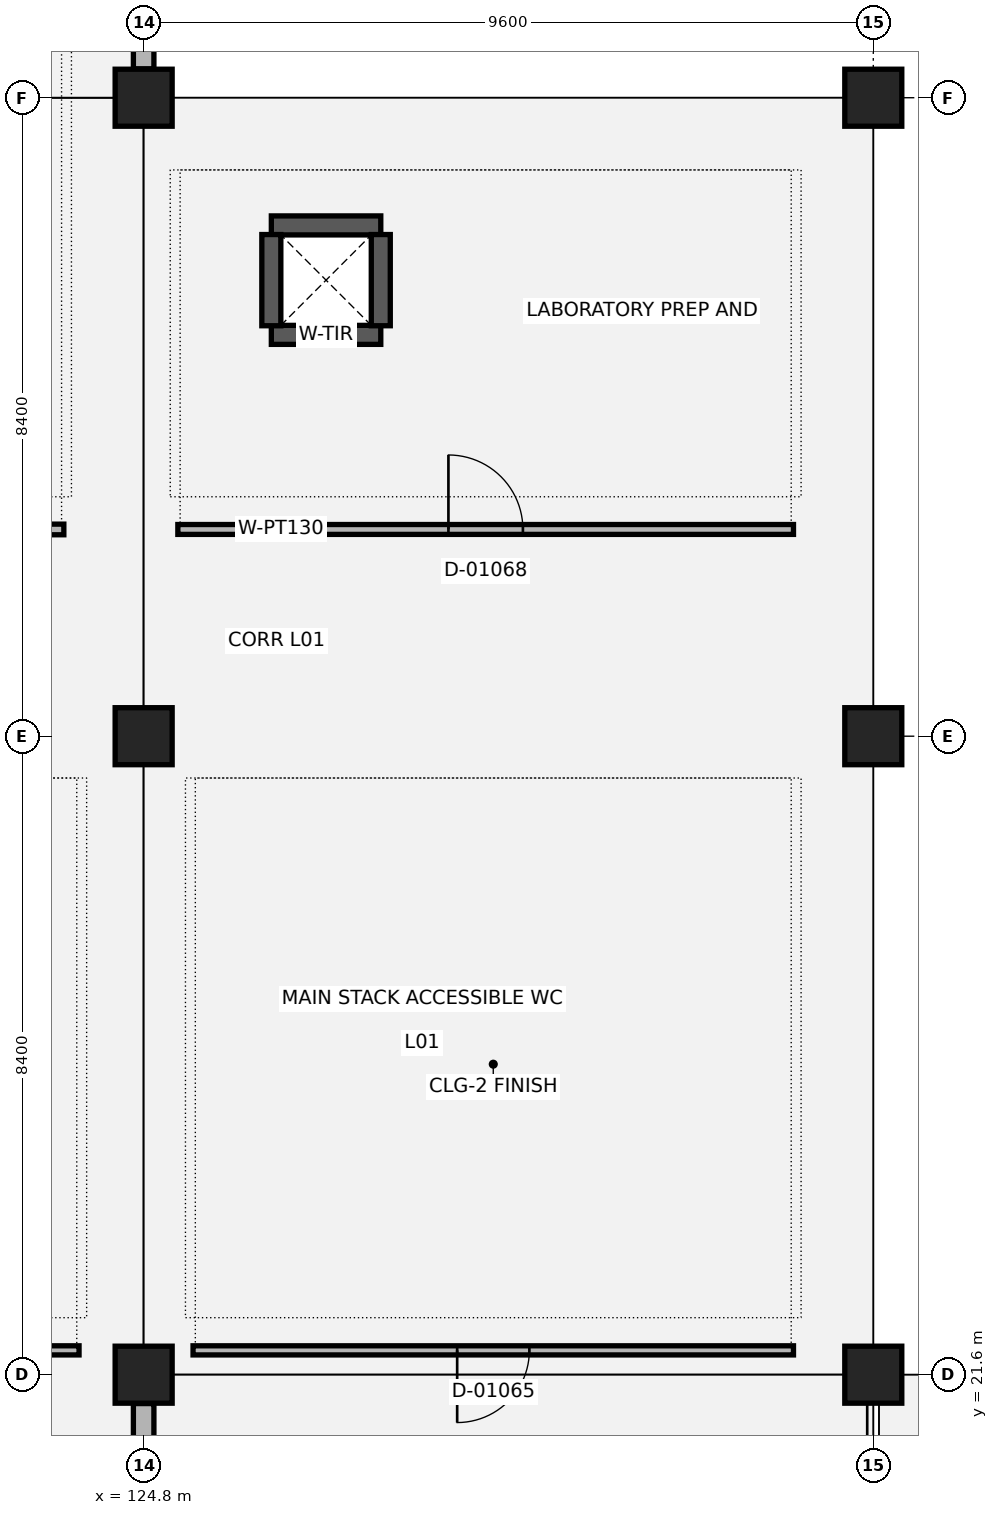
"""IFC4 building model, lengths in metres.
Left out: names, types, materials, properties, quantities, classifications, styles, units other than length and angle.
Written with IfcOpenShell. Run it as: python <this file> out.ifc"""

import sys

from ifc_helpers import new_model, si_unit, direction, frame, frame_2d, origin, origin_2d, place, context, subcontext, project, spatial, rectangle, extrude, element, fill, save


model = new_model("IFC4")
c1 = context("Model", 3, precision=1e-05, world=origin(), true_north=direction((0.0, 1.0)))
c2 = subcontext(c1, "Body", "Model", "MODEL_VIEW")
j1 = project(units=[si_unit("LENGTHUNIT", "METRE"), si_unit("PLANEANGLEUNIT", "RADIAN")], contexts=[c1])
p1 = place(None, origin())
s1 = spatial("IfcSite", under=j1, at=p1, CompositionType="ELEMENT")
p2 = place(p1, origin())
s2 = spatial("IfcBuilding", under=s1, at=p2, CompositionType="ELEMENT")
p3 = place(p2, frame((0.0, 0.0, 5.4)))
s3 = spatial("IfcBuildingStorey", under=s2, at=p3, CompositionType="ELEMENT", Elevation=5.4)
for number, where, z_axis, x_axis in (
    (1, (124.8, 21.6, 0.0), (0.0, 0.0, 1.0), (1.0, 0.0, 0.0)),
    (2, (124.8, 30.0, 0.0), (0.0, 0.0, 1.0), (1.0, 0.0, 0.0)),
    (3, (124.8, 38.4, 0.0), (0.0, 0.0, 1.0), (1.0, 0.0, 0.0)),
    (4, (134.4, 21.6, 0.0), (0.0, 0.0, 1.0), (1.0, 0.0, 0.0)),
    (5, (134.4, 30.0, 0.0), (0.0, 0.0, 1.0), (1.0, 0.0, 0.0)),
    (6, (134.4, 38.4, 0.0), (0.0, 0.0, 1.0), (1.0, 0.0, 0.0)),
):
    element("IfcColumn", number, at=place(p3, frame(where, z_axis=z_axis, x_axis=x_axis)), inside=s3, PredefinedType="COLUMN", context=c2, shape_type="SweptSolid", body=[
        extrude(rectangle(XDim=0.75, YDim=0.75, at=origin_2d()), origin(), (0.0, 0.0, 1.0), 4.8),
    ])
for number, where, z_axis, x_axis in (
    (7, (126.48, 35.28, 0.0), (0.0, 0.0, 1.0), (1.0, 0.0, 0.0)),
    (8, (126.48, 36.72, 0.0), (0.0, 0.0, 1.0), (1.0, 0.0, 0.0)),
):
    element("IfcWall", number, at=place(p3, frame(where, z_axis=z_axis, x_axis=x_axis)), inside=s3, PredefinedType="SHEAR", context=c2, shape_type="SweptSolid", body=[
        extrude(rectangle(XDim=1.44, YDim=0.25, at=frame_2d((0.72, 0.0))), origin(), (0.0, 0.0, 1.0), 3.6),
    ])
for number, where, z_axis, x_axis in (
    (9, (126.48, 35.4, 0.0), (0.0, 0.0, 1.0), (0.0, 1.0, 0.0)),
    (10, (127.92, 35.4, 0.0), (0.0, 0.0, 1.0), (0.0, 1.0, 0.0)),
):
    element("IfcWall", number, at=place(p3, frame(where, z_axis=z_axis, x_axis=x_axis)), inside=s3, PredefinedType="SHEAR", context=c2, shape_type="SweptSolid", body=[
        extrude(rectangle(XDim=1.2, YDim=0.25, at=frame_2d((0.6, 0.0))), origin(), (0.0, 0.0, 1.0), 3.6),
    ])
p4 = place(p3, frame((124.8, 38.78, 0.0), z_axis=(0.0, 0.0, 1.0), x_axis=(0.0, 1.0, 0.0)))
e11 = element("IfcWall", 11, at=p4, inside=s3, PredefinedType="SOLIDWALL", context=c2, shape_type="SweptSolid", body=[
    extrude(rectangle(XDim=4.04, YDim=0.27, at=frame_2d((2.02, 0.0))), origin(), (0.0, 0.0, 1.0), 3.28),
])
p5 = place(p4, frame((1.32, 0.0, 0.9)))
e12 = element("IfcOpeningElement", 12, at=p5, cuts=e11, PredefinedType="OPENING", context=c2, shape_type="SweptSolid", body=[
    extrude(rectangle(XDim=1.4, YDim=1.4, at=frame_2d((0.7, 0.7))), frame((0.0, 0.145, 0.0), z_axis=(0.0, -1.0, 0.0), x_axis=(1.0, 0.0, 0.0)), (0.0, 0.0, 1.0), 0.29),
])
p6 = place(p3, frame((124.8, 13.58, 0.0), z_axis=(0.0, 0.0, 1.0), x_axis=(0.0, 1.0, 0.0)))
e13 = element("IfcWall", 13, at=p6, inside=s3, PredefinedType="SOLIDWALL", context=c2, shape_type="SweptSolid", body=[
    extrude(rectangle(XDim=7.64, YDim=0.27, at=frame_2d((3.82, 0.0))), origin(), (0.0, 0.0, 1.0), 3.28),
])
p7 = place(p6, frame((2.92, 0.0, 0.9)))
e14 = element("IfcOpeningElement", 14, at=p7, cuts=e13, PredefinedType="OPENING", context=c2, shape_type="SweptSolid", body=[
    extrude(rectangle(XDim=1.8, YDim=1.5, at=frame_2d((0.9, 0.75))), frame((0.0, 0.145, 0.0), z_axis=(0.0, -1.0, 0.0), x_axis=(1.0, 0.0, 0.0)), (0.0, 0.0, 1.0), 0.29),
])
p8 = place(p3, frame((116.05, 21.92, 0.0), z_axis=(0.0, 0.0, 1.0), x_axis=(1.0, 0.0, 0.0)))
e15 = element("IfcWall", 15, at=p8, inside=s3, PredefinedType="PARTITIONING", context=c2, shape_type="SweptSolid", body=[
    extrude(rectangle(XDim=7.9, YDim=0.12, at=frame_2d((3.95, 0.0))), origin(), (0.0, 0.0, 1.0), 3.26),
])
p9 = place(p8, frame((1.322, 0.0, 0.0)))
e16 = element("IfcOpeningElement", 16, at=p9, cuts=e15, PredefinedType="OPENING", context=c2, shape_type="SweptSolid", body=[
    extrude(rectangle(XDim=0.95, YDim=2.1, at=frame_2d((0.475, 1.05))), frame((0.0, 0.07, 0.0), z_axis=(0.0, -1.0, 0.0), x_axis=(1.0, 0.0, 0.0)), (0.0, 0.0, 1.0), 0.14),
])
p10 = place(p3, frame((125.45, 21.92, 0.0), z_axis=(0.0, 0.0, 1.0), x_axis=(1.0, 0.0, 0.0)))
e17 = element("IfcWall", 17, at=p10, inside=s3, PredefinedType="PARTITIONING", context=c2, shape_type="SweptSolid", body=[
    extrude(rectangle(XDim=7.9, YDim=0.12, at=frame_2d((3.95, 0.0))), origin(), (0.0, 0.0, 1.0), 3.26),
])
p11 = place(p10, frame((3.475, 0.0, 0.0)))
e18 = element("IfcOpeningElement", 18, at=p11, cuts=e17, PredefinedType="OPENING", context=c2, shape_type="SweptSolid", body=[
    extrude(rectangle(XDim=0.95, YDim=2.1, at=frame_2d((0.475, 1.05))), frame((0.0, 0.07, 0.0), z_axis=(0.0, -1.0, 0.0), x_axis=(1.0, 0.0, 0.0)), (0.0, 0.0, 1.0), 0.14),
])
p12 = place(p3, frame((96.85, 32.72, 0.0), z_axis=(0.0, 0.0, 1.0), x_axis=(1.0, 0.0, 0.0)))
e19 = element("IfcWall", 19, at=p12, inside=s3, PredefinedType="PARTITIONING", context=c2, shape_type="SweptSolid", body=[
    extrude(rectangle(XDim=26.9, YDim=0.14, at=frame_2d((13.45, 0.0))), origin(), (0.0, 0.0, 1.0), 3.26),
])
p13 = place(p12, frame((12.91, 0.0, 0.0)))
e20 = element("IfcOpeningElement", 20, at=p13, cuts=e19, PredefinedType="OPENING", context=c2, shape_type="SweptSolid", body=[
    extrude(rectangle(XDim=1.08, YDim=2.15, at=frame_2d((0.54, 1.075))), frame((0.0, 0.08, 0.0), z_axis=(0.0, -1.0, 0.0), x_axis=(1.0, 0.0, 0.0)), (0.0, 0.0, 1.0), 0.16),
])
p14 = place(p3, frame((125.25, 32.72, 0.0), z_axis=(0.0, 0.0, 1.0), x_axis=(1.0, 0.0, 0.0)))
e21 = element("IfcWall", 21, at=p14, inside=s3, PredefinedType="PARTITIONING", context=c2, shape_type="SweptSolid", body=[
    extrude(rectangle(XDim=8.1, YDim=0.13, at=frame_2d((4.05, 0.0))), origin(), (0.0, 0.0, 1.0), 3.26),
])
p15 = place(p14, frame((3.56, 0.0, 0.0)))
e22 = element("IfcOpeningElement", 22, at=p15, cuts=e21, PredefinedType="OPENING", context=c2, shape_type="SweptSolid", body=[
    extrude(rectangle(XDim=0.98, YDim=2.1, at=frame_2d((0.49, 1.05))), frame((0.0, 0.075, 0.0), z_axis=(0.0, -1.0, 0.0), x_axis=(1.0, 0.0, 0.0)), (0.0, 0.0, 1.0), 0.15),
])
p16 = place(p11, origin())
e23 = element("IfcDoor", 23, at=p16, inside=s3, OperationType="SINGLE_SWING_RIGHT", PredefinedType="DOOR", context=c2, shape_type="SweptSolid", body=[
    extrude(rectangle(XDim=0.95, YDim=2.1, at=frame_2d((0.475, 1.05))), frame((0.0, 0.025, 0.0), z_axis=(0.0, -1.0, 0.0), x_axis=(1.0, 0.0, 0.0)), (0.0, 0.0, 1.0), 0.05),
])
fill(e18, e23)
p17 = place(p15, origin())
e24 = element("IfcDoor", 24, at=p17, inside=s3, OperationType="SINGLE_SWING_LEFT", PredefinedType="DOOR", context=c2, shape_type="SweptSolid", body=[
    extrude(rectangle(XDim=0.98, YDim=2.1, at=frame_2d((0.49, 1.05))), frame((0.0, 0.025, 0.0), z_axis=(0.0, -1.0, 0.0), x_axis=(1.0, 0.0, 0.0)), (0.0, 0.0, 1.0), 0.05),
])
fill(e22, e24)
save(model, sys.argv[1])
